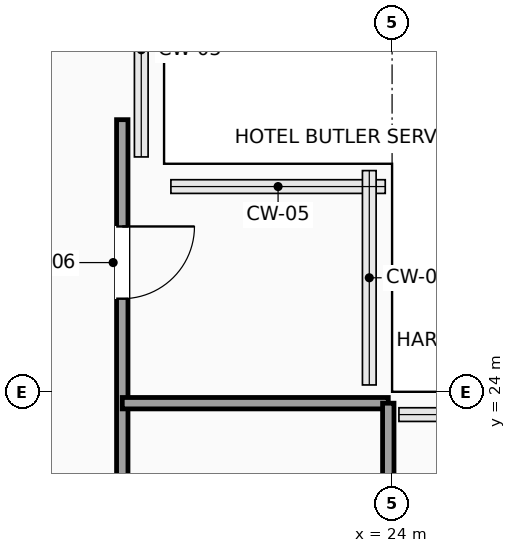
"""IFC4 building model, lengths in metres.
Left out: names, types, materials, properties, quantities, classifications, styles, units other than length and angle.
Written with IfcOpenShell. Run it as: python <this file> out.ifc"""

import sys

from ifc_helpers import new_model, si_unit, direction, frame, frame_2d, origin, place, context, subcontext, project, spatial, rectangle, extrude, element, fill, save


model = new_model("IFC4")
c1 = context("Model", 3, precision=1e-05, world=origin(), true_north=direction((0.0, 1.0)))
c2 = subcontext(c1, "Body", "Model", "MODEL_VIEW")
j1 = project(units=[si_unit("LENGTHUNIT", "METRE"), si_unit("PLANEANGLEUNIT", "RADIAN")], contexts=[c1])
p1 = place(None, origin())
s1 = spatial("IfcSite", under=j1, at=p1, CompositionType="ELEMENT")
p2 = place(p1, origin())
s2 = spatial("IfcBuilding", under=s1, at=p2, CompositionType="ELEMENT")
p3 = place(p2, frame((0.0, 0.0, 288.7)))
s3 = spatial("IfcBuildingStorey", under=s2, at=p3, CompositionType="ELEMENT", Elevation=288.7)
p4 = place(p3, frame((20.45, 27.58, 0.0), z_axis=(0.0, 0.0, 1.0), x_axis=(0.0, -1.0, 0.0)))
e1 = element("IfcWall", 1, at=p4, inside=s3, PredefinedType="PARTITIONING", context=c2, shape_type="SweptSolid", body=[
    extrude(rectangle(XDim=7.38, YDim=0.15, at=frame_2d((3.69, 0.0))), origin(), (0.0, 0.0, 1.0), 3.3),
])
p5 = place(p4, frame((5.105, 0.0, 0.0)))
e2 = element("IfcOpeningElement", 2, at=p5, cuts=e1, PredefinedType="OPENING", context=c2, shape_type="SweptSolid", body=[
    extrude(rectangle(XDim=0.9, YDim=2.1, at=frame_2d((0.45, 1.05))), frame((0.0, 0.085, 0.0), z_axis=(0.0, -1.0, 0.0), x_axis=(1.0, 0.0, 0.0)), (0.0, 0.0, 1.0), 0.17),
])
p6 = place(p4, frame((1.405, 0.0, 0.0)))
e3 = element("IfcOpeningElement", 3, at=p6, cuts=e1, PredefinedType="OPENING", context=c2, shape_type="SweptSolid", body=[
    extrude(rectangle(XDim=0.95, YDim=2.15, at=frame_2d((0.475, 1.075))), frame((0.0, 0.085, 0.0), z_axis=(0.0, -1.0, 0.0), x_axis=(1.0, 0.0, 0.0)), (0.0, 0.0, 1.0), 0.17),
])
p7 = place(p3, frame((20.45, 23.85, 0.0), z_axis=(0.0, 0.0, 1.0), x_axis=(1.0, 0.0, 0.0)))
e4 = element("IfcWall", 4, at=p7, inside=s3, PredefinedType="PARTITIONING", context=c2, shape_type="SweptSolid", body=[
    extrude(rectangle(XDim=3.5, YDim=0.15, at=frame_2d((1.75, 0.0))), origin(), (0.0, 0.0, 1.0), 3.3),
])
p8 = place(p3, frame((23.95, 20.2, 0.0), z_axis=(0.0, 0.0, 1.0), x_axis=(0.0, 1.0, 0.0)))
e5 = element("IfcWall", 5, at=p8, inside=s3, PredefinedType="PARTITIONING", context=c2, shape_type="SweptSolid", body=[
    extrude(rectangle(XDim=3.65, YDim=0.15, at=frame_2d((1.825, 0.0))), origin(), (0.0, 0.0, 1.0), 3.3),
])
p9 = place(p6, origin())
e6 = element("IfcDoor", 6, at=p9, inside=s3, OperationType="SINGLE_SWING_LEFT", PredefinedType="DOOR", context=c2, shape_type="SweptSolid", body=[
    extrude(rectangle(XDim=0.95, YDim=2.15, at=frame_2d((0.475, 1.075))), frame((0.0, 0.025, 0.0), z_axis=(0.0, -1.0, 0.0), x_axis=(1.0, 0.0, 0.0)), (0.0, 0.0, 1.0), 0.05),
])
fill(e3, e6)
save(model, sys.argv[1])
